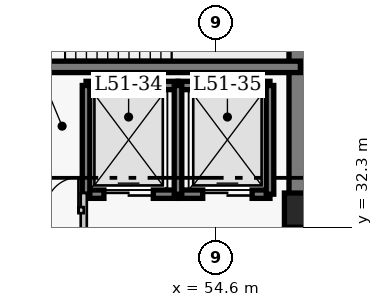
"""IFC4 building model, lengths in metres.
Left out: names, types, materials, properties, quantities, classifications, styles, units other than length and angle.
Written with IfcOpenShell. Run it as: python <this file> out.ifc"""

import sys

from ifc_helpers import new_model, si_unit, direction, frame, frame_2d, origin, origin_2d, place, context, subcontext, project, spatial, rectangle, extrude, element, fill, save


model = new_model("IFC4")
c1 = context("Model", 3, precision=1e-05, world=origin(), true_north=direction((0.0, 1.0)))
c2 = subcontext(c1, "Body", "Model", "MODEL_VIEW")
j1 = project(units=[si_unit("LENGTHUNIT", "METRE"), si_unit("PLANEANGLEUNIT", "RADIAN")], contexts=[c1])
p1 = place(None, origin())
s1 = spatial("IfcSite", under=j1, at=p1, CompositionType="ELEMENT")
p2 = place(p1, origin())
s2 = spatial("IfcBuilding", under=s1, at=p2, CompositionType="ELEMENT")
p3 = place(p2, frame((0.0, 0.0, 204.6)))
s3 = spatial("IfcBuildingStorey", under=s2, at=p3, CompositionType="ELEMENT", Elevation=204.6)
p4 = place(p3, frame((56.82, 27.05, 0.0), z_axis=(0.0, 0.0, 1.0), x_axis=(0.0, 1.0, 0.0)))
e1 = element("IfcWall", 1, at=p4, inside=s3, PredefinedType="SHEAR", context=c2, shape_type="SweptSolid", body=[
    extrude(rectangle(XDim=13.57, YDim=0.6, at=frame_2d((6.785, 0.0))), origin(), (0.0, 0.0, 1.0), 3.9),
])
p5 = place(p3, frame((48.45, 36.52, 0.0), z_axis=(0.0, 0.0, 1.0), x_axis=(1.0, 0.0, 0.0)))
e2 = element("IfcWall", 2, at=p5, inside=s3, PredefinedType="SHEAR", context=c2, shape_type="SweptSolid", body=[
    extrude(rectangle(XDim=8.37, YDim=0.3, at=frame_2d((4.185, 0.0))), origin(), (0.0, 0.0, 1.0), 3.9),
])
p6 = place(p3, frame((56.85, 32.75, 0.0), z_axis=(0.0, 0.0, 1.0), x_axis=(1.0, 0.0, 0.0)))
e3 = element("IfcColumn", 3, at=p6, inside=s3, PredefinedType="COLUMN", context=c2, shape_type="SweptSolid", body=[
    extrude(rectangle(XDim=0.9, YDim=0.9, at=origin_2d()), origin(), (0.0, 0.0, 1.0), 3.9),
])
p7 = place(p3, frame((51.18, 36.03, 0.0), z_axis=(0.0, 0.0, 1.0), x_axis=(1.0, 0.0, 0.0)))
e4 = element("IfcWall", 4, at=p7, inside=s3, PredefinedType="SHEAR", context=c2, shape_type="SweptSolid", body=[
    extrude(rectangle(XDim=2.42, YDim=0.22, at=frame_2d((1.21, 0.0))), origin(), (0.0, 0.0, 1.0), 3.9),
])
p8 = place(p3, frame((51.18, 33.17, 0.0), z_axis=(0.0, 0.0, 1.0), x_axis=(1.0, 0.0, 0.0)))
e5 = element("IfcWall", 5, at=p8, inside=s3, PredefinedType="SHEAR", context=c2, shape_type="SweptSolid", body=[
    extrude(rectangle(XDim=2.42, YDim=0.22, at=frame_2d((1.21, 0.0))), origin(), (0.0, 0.0, 1.0), 3.9),
])
p9 = place(p8, frame((0.47, 0.0, 0.0)))
e6 = element("IfcOpeningElement", 6, at=p9, cuts=e5, PredefinedType="OPENING", context=c2, shape_type="SweptSolid", body=[
    extrude(rectangle(XDim=1.3, YDim=2.15, at=frame_2d((0.65, 1.075))), frame((0.0, 0.12, 0.0), z_axis=(0.0, -1.0, 0.0), x_axis=(1.0, 0.0, 0.0)), (0.0, 0.0, 1.0), 0.24),
])
p10 = place(p3, frame((51.18, 33.17, 0.0), z_axis=(0.0, 0.0, 1.0), x_axis=(0.0, 1.0, 0.0)))
e7 = element("IfcWall", 7, at=p10, inside=s3, PredefinedType="SHEAR", context=c2, shape_type="SweptSolid", body=[
    extrude(rectangle(XDim=2.86, YDim=0.2, at=frame_2d((1.43, 0.0))), origin(), (0.0, 0.0, 1.0), 3.9),
])
p11 = place(p3, frame((53.6, 36.03, 0.0), z_axis=(0.0, 0.0, 1.0), x_axis=(1.0, 0.0, 0.0)))
e8 = element("IfcWall", 8, at=p11, inside=s3, PredefinedType="SHEAR", context=c2, shape_type="SweptSolid", body=[
    extrude(rectangle(XDim=2.42, YDim=0.22, at=frame_2d((1.21, 0.0))), origin(), (0.0, 0.0, 1.0), 3.9),
])
p12 = place(p3, frame((53.6, 33.17, 0.0), z_axis=(0.0, 0.0, 1.0), x_axis=(1.0, 0.0, 0.0)))
e9 = element("IfcWall", 9, at=p12, inside=s3, PredefinedType="SHEAR", context=c2, shape_type="SweptSolid", body=[
    extrude(rectangle(XDim=2.42, YDim=0.22, at=frame_2d((1.21, 0.0))), origin(), (0.0, 0.0, 1.0), 3.9),
])
p13 = place(p12, frame((0.65, 0.0, 0.0)))
e10 = element("IfcOpeningElement", 10, at=p13, cuts=e9, PredefinedType="OPENING", context=c2, shape_type="SweptSolid", body=[
    extrude(rectangle(XDim=1.3, YDim=2.15, at=frame_2d((0.65, 1.075))), frame((0.0, 0.12, 0.0), z_axis=(0.0, -1.0, 0.0), x_axis=(1.0, 0.0, 0.0)), (0.0, 0.0, 1.0), 0.24),
])
for number, where, z_axis, x_axis in (
    (11, (53.6, 33.17, 0.0), (0.0, 0.0, 1.0), (0.0, 1.0, 0.0)),
    (12, (56.02, 33.17, 0.0), (0.0, 0.0, 1.0), (0.0, 1.0, 0.0)),
):
    element("IfcWall", number, at=place(p3, frame(where, z_axis=z_axis, x_axis=x_axis)), inside=s3, PredefinedType="SHEAR", context=c2, shape_type="SweptSolid", body=[
        extrude(rectangle(XDim=2.86, YDim=0.2, at=frame_2d((1.43, 0.0))), origin(), (0.0, 0.0, 1.0), 3.9),
    ])
p14 = place(p3, frame((51.12, 29.5, 0.0), z_axis=(0.0, 0.0, 1.0), x_axis=(0.0, 1.0, 0.0)))
e13 = element("IfcWall", 13, at=p14, inside=s3, PredefinedType="PARTITIONING", context=c2, shape_type="SweptSolid", body=[
    extrude(rectangle(XDim=3.7, YDim=0.16, at=frame_2d((1.85, 0.0))), origin(), (0.0, 0.0, 1.0), 3.65),
])
p15 = place(p14, frame((0.9, 0.0, 0.0)))
e14 = element("IfcOpeningElement", 14, at=p15, cuts=e13, PredefinedType="OPENING", context=c2, shape_type="SweptSolid", body=[
    extrude(rectangle(XDim=1.1, YDim=2.15, at=frame_2d((0.55, 1.075))), frame((0.0, 0.09, 0.0), z_axis=(0.0, -1.0, 0.0), x_axis=(1.0, 0.0, 0.0)), (0.0, 0.0, 1.0), 0.18),
])
p16 = place(p3, frame((48.92, 32.75, 0.0), z_axis=(0.0, 0.0, 1.0), x_axis=(1.0, 0.0, 0.0)))
e15 = element("IfcWall", 15, at=p16, inside=s3, PredefinedType="PARTITIONING", context=c2, shape_type="SweptSolid", body=[
    extrude(rectangle(XDim=2.2, YDim=0.16, at=frame_2d((1.1, 0.0))), origin(), (0.0, 0.0, 1.0), 3.65),
])
p17 = place(p16, frame((0.14, 0.0, 0.0)))
e16 = element("IfcOpeningElement", 16, at=p17, cuts=e15, PredefinedType="OPENING", context=c2, shape_type="SweptSolid", body=[
    extrude(rectangle(XDim=0.86, YDim=2.05, at=frame_2d((0.43, 1.025))), frame((0.0, 0.09, 0.0), z_axis=(0.0, -1.0, 0.0), x_axis=(1.0, 0.0, 0.0)), (0.0, 0.0, 1.0), 0.18),
])
p18 = place(p16, frame((1.2, 0.0, 0.0)))
e17 = element("IfcOpeningElement", 17, at=p18, cuts=e15, PredefinedType="OPENING", context=c2, shape_type="SweptSolid", body=[
    extrude(rectangle(XDim=0.86, YDim=2.05, at=frame_2d((0.43, 1.025))), frame((0.0, 0.09, 0.0), z_axis=(0.0, -1.0, 0.0), x_axis=(1.0, 0.0, 0.0)), (0.0, 0.0, 1.0), 0.18),
])
p19 = place(p9, origin())
e18 = element("IfcDoor", 18, at=p19, inside=s3, OperationType="DOUBLE_DOOR_SLIDING", PredefinedType="DOOR", context=c2, shape_type="SweptSolid", body=[
    extrude(rectangle(XDim=1.3, YDim=2.15, at=frame_2d((0.65, 1.075))), frame((0.0, 0.025, 0.0), z_axis=(0.0, -1.0, 0.0), x_axis=(1.0, 0.0, 0.0)), (0.0, 0.0, 1.0), 0.05),
])
fill(e6, e18)
p20 = place(p13, origin())
e19 = element("IfcDoor", 19, at=p20, inside=s3, OperationType="DOUBLE_DOOR_SLIDING", PredefinedType="DOOR", context=c2, shape_type="SweptSolid", body=[
    extrude(rectangle(XDim=1.3, YDim=2.15, at=frame_2d((0.65, 1.075))), frame((0.0, 0.025, 0.0), z_axis=(0.0, -1.0, 0.0), x_axis=(1.0, 0.0, 0.0)), (0.0, 0.0, 1.0), 0.05),
])
fill(e10, e19)
p21 = place(p18, origin())
e20 = element("IfcDoor", 20, at=p21, inside=s3, OperationType="SINGLE_SWING_RIGHT", PredefinedType="DOOR", context=c2, shape_type="SweptSolid", body=[
    extrude(rectangle(XDim=0.86, YDim=2.05, at=frame_2d((0.43, 1.025))), frame((0.0, 0.025, 0.0), z_axis=(0.0, -1.0, 0.0), x_axis=(1.0, 0.0, 0.0)), (0.0, 0.0, 1.0), 0.05),
])
fill(e17, e20)
save(model, sys.argv[1])
